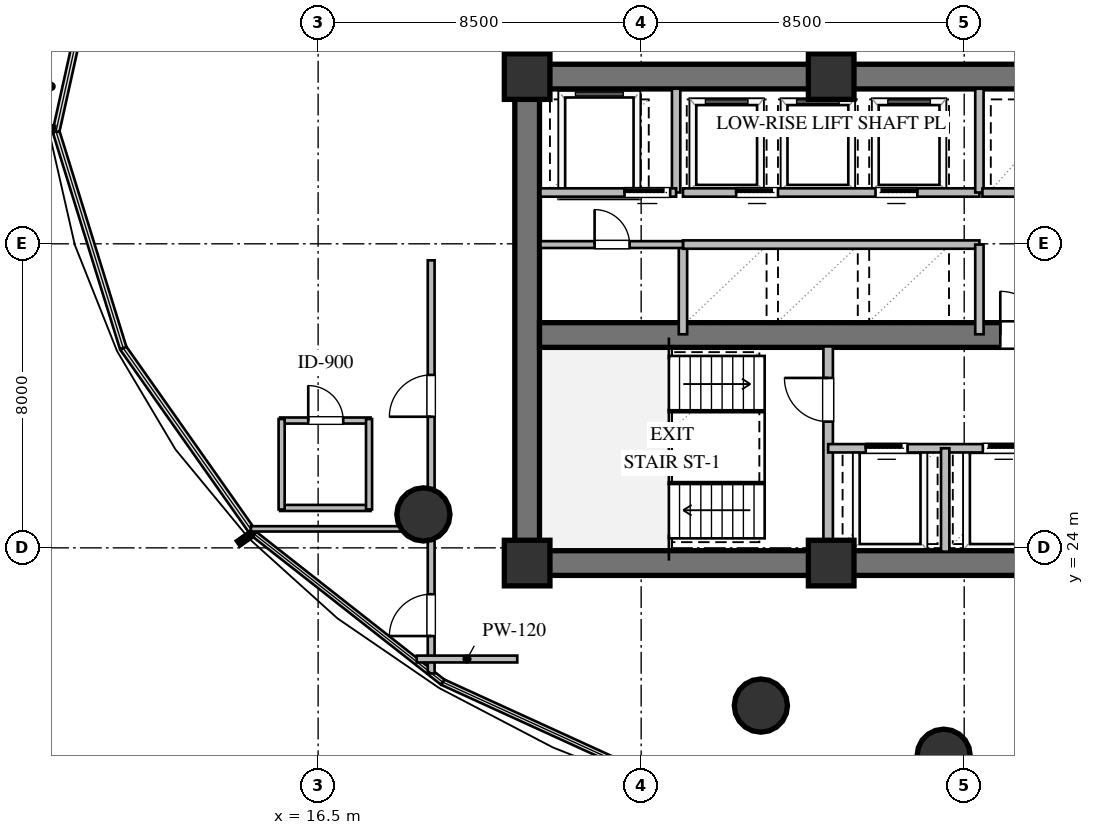
"""IFC4 building model, lengths in metres.
Left out: names, types, materials, properties, quantities, classifications, styles, units other than length and angle.
Written with IfcOpenShell. Run it as: python <this file> out.ifc"""

import sys

from ifc_helpers import new_model, si_unit, direction, frame, frame_2d, origin, origin_2d, place, context, subcontext, project, spatial, rectangle, circle, extrude, element, fill, save


model = new_model("IFC4")
c1 = context("Model", 3, precision=1e-05, world=origin(), true_north=direction((0.0, 1.0)))
c2 = subcontext(c1, "Body", "Model", "MODEL_VIEW")
j1 = project(units=[si_unit("LENGTHUNIT", "METRE"), si_unit("PLANEANGLEUNIT", "RADIAN")], contexts=[c1])
p1 = place(None, origin())
s1 = spatial("IfcSite", under=j1, at=p1, CompositionType="ELEMENT")
p2 = place(p1, origin())
s2 = spatial("IfcBuilding", under=s1, at=p2, CompositionType="ELEMENT")
p3 = place(p2, frame((0.0, 0.0, 49.2)))
s3 = spatial("IfcBuildingStorey", under=s2, at=p3, CompositionType="ELEMENT", Elevation=49.2)
for number, where, z_axis, x_axis in (
    (1, (21.675, 23.6, 0.0), (0.0, 0.0, 1.0), (1.0, 0.0, 0.0)),
    (2, (21.675, 36.4, 0.0), (0.0, 0.0, 1.0), (1.0, 0.0, 0.0)),
):
    element("IfcWall", number, at=place(p3, frame(where, z_axis=z_axis, x_axis=x_axis)), inside=s3, PredefinedType="SHEAR", context=c2, shape_type="SweptSolid", body=[
        extrude(rectangle(XDim=22.65, YDim=0.65, at=frame_2d((11.325, 0.0))), origin(), (0.0, 0.0, 1.0), 3.36),
    ])
p4 = place(p3, frame((22.0, 23.925, 0.0), z_axis=(0.0, 0.0, 1.0), x_axis=(0.0, 1.0, 0.0)))
e3 = element("IfcWall", 3, at=p4, inside=s3, PredefinedType="SHEAR", context=c2, shape_type="SweptSolid", body=[
    extrude(rectangle(XDim=12.15, YDim=0.65, at=frame_2d((6.075, 0.0))), origin(), (0.0, 0.0, 1.0), 3.36),
])
p5 = place(p3, frame((22.325, 29.6, 0.0), z_axis=(0.0, 0.0, 1.0), x_axis=(1.0, 0.0, 0.0)))
e4 = element("IfcWall", 4, at=p5, inside=s3, PredefinedType="SHEAR", context=c2, shape_type="SweptSolid", body=[
    extrude(rectangle(XDim=21.35, YDim=0.65, at=frame_2d((10.675, 0.0))), origin(), (0.0, 0.0, 1.0), 3.36),
])
p6 = place(p5, frame((12.125, 0.0, 0.0)))
e5 = element("IfcOpeningElement", 5, at=p6, cuts=e4, PredefinedType="OPENING", context=c2, shape_type="SweptSolid", body=[
    extrude(rectangle(XDim=1.15, YDim=2.1, at=frame_2d((0.575, 1.05))), frame((0.0, 0.335, 0.0), z_axis=(0.0, -1.0, 0.0), x_axis=(1.0, 0.0, 0.0)), (0.0, 0.0, 1.0), 0.67),
])
for number, where, z_axis, x_axis in (
    (6, (22.0, 23.6, 0.0), (0.0, 0.0, 1.0), (1.0, 0.0, 0.0)),
    (7, (30.0, 23.6, 0.0), (0.0, 0.0, 1.0), (1.0, 0.0, 0.0)),
    (8, (30.0, 36.4, 0.0), (0.0, 0.0, 1.0), (1.0, 0.0, 0.0)),
    (9, (22.0, 36.4, 0.0), (0.0, 0.0, 1.0), (1.0, 0.0, 0.0)),
):
    element("IfcColumn", number, at=place(p3, frame(where, z_axis=z_axis, x_axis=x_axis)), inside=s3, PredefinedType="COLUMN", context=c2, shape_type="SweptSolid", body=[
        extrude(rectangle(XDim=1.2, YDim=1.2, at=origin_2d()), origin(), (0.0, 0.0, 1.0), 3.6),
    ])
for number, where, z_axis, x_axis in (
    (10, (19.27, 24.88, 0.0), (0.0, 0.0, 1.0), (1.0, 0.0, 0.0)),
    (11, (28.15, 19.85, 0.0), (0.0, 0.0, 1.0), (1.0, 0.0, 0.0)),
    (12, (32.96, 18.53, 0.0), (0.0, 0.0, 1.0), (1.0, 0.0, 0.0)),
):
    element("IfcColumn", number, at=place(p3, frame(where, z_axis=z_axis, x_axis=x_axis)), inside=s3, PredefinedType="COLUMN", context=c2, shape_type="SweptSolid", body=[
        extrude(circle(Radius=0.7, at=origin_2d()), origin(), (0.0, 0.0, 1.0), 3.6),
    ])
p7 = place(p3, frame((29.92, 23.9, 0.0), z_axis=(0.0, 0.0, 1.0), x_axis=(0.0, 1.0, 0.0)))
e13 = element("IfcWall", 13, at=p7, inside=s3, PredefinedType="SOLIDWALL", context=c2, shape_type="SweptSolid", body=[
    extrude(rectangle(XDim=5.4, YDim=0.25, at=frame_2d((2.7, 0.0))), origin(), (0.0, 0.0, 1.0), 3.36),
])
p8 = place(p7, frame((3.421, 0.0, 0.0)))
e14 = element("IfcOpeningElement", 14, at=p8, cuts=e13, PredefinedType="OPENING", context=c2, shape_type="SweptSolid", body=[
    extrude(rectangle(XDim=1.15, YDim=2.1, at=frame_2d((0.575, 1.05))), frame((0.0, 0.135, 0.0), z_axis=(0.0, -1.0, 0.0), x_axis=(1.0, 0.0, 0.0)), (0.0, 0.0, 1.0), 0.27),
])
p9 = place(p3, frame((29.92, 26.62, 0.0), z_axis=(0.0, 0.0, 1.0), x_axis=(1.0, 0.0, 0.0)))
e15 = element("IfcWall", 15, at=p9, inside=s3, PredefinedType="SOLIDWALL", context=c2, shape_type="SweptSolid", body=[
    extrude(rectangle(XDim=6.16, YDim=0.22, at=frame_2d((3.08, 0.0))), origin(), (0.0, 0.0, 1.0), 3.36),
])
p10 = place(p9, frame((0.99, 0.0, 0.0)))
e16 = element("IfcOpeningElement", 16, at=p10, cuts=e15, PredefinedType="OPENING", context=c2, shape_type="SweptSolid", body=[
    extrude(rectangle(XDim=1.1, YDim=2.1, at=frame_2d((0.55, 1.05))), frame((0.0, 0.12, 0.0), z_axis=(0.0, -1.0, 0.0), x_axis=(1.0, 0.0, 0.0)), (0.0, 0.0, 1.0), 0.24),
])
p11 = place(p9, frame((4.07, 0.0, 0.0)))
e17 = element("IfcOpeningElement", 17, at=p11, cuts=e15, PredefinedType="OPENING", context=c2, shape_type="SweptSolid", body=[
    extrude(rectangle(XDim=1.1, YDim=2.1, at=frame_2d((0.55, 1.05))), frame((0.0, 0.12, 0.0), z_axis=(0.0, -1.0, 0.0), x_axis=(1.0, 0.0, 0.0)), (0.0, 0.0, 1.0), 0.24),
])
p12 = place(p3, frame((33.0, 23.9, 0.0), z_axis=(0.0, 0.0, 1.0), x_axis=(0.0, 1.0, 0.0)))
e18 = element("IfcWall", 18, at=p12, inside=s3, PredefinedType="SOLIDWALL", context=c2, shape_type="SweptSolid", body=[
    extrude(rectangle(XDim=2.72, YDim=0.22, at=frame_2d((1.36, 0.0))), origin(), (0.0, 0.0, 1.0), 3.36),
])
p13 = place(p3, frame((25.92, 33.35, 0.0), z_axis=(0.0, 0.0, 1.0), x_axis=(0.0, 1.0, 0.0)))
e19 = element("IfcWall", 19, at=p13, inside=s3, PredefinedType="SOLIDWALL", context=c2, shape_type="SweptSolid", body=[
    extrude(rectangle(XDim=2.73, YDim=0.22, at=frame_2d((1.365, 0.0))), origin(), (0.0, 0.0, 1.0), 3.36),
])
p14 = place(p3, frame((22.35, 33.35, 0.0), z_axis=(0.0, 0.0, 1.0), x_axis=(1.0, 0.0, 0.0)))
e20 = element("IfcWall", 20, at=p14, inside=s3, PredefinedType="SOLIDWALL", context=c2, shape_type="SweptSolid", body=[
    extrude(rectangle(XDim=3.57, YDim=0.22, at=frame_2d((1.785, 0.0))), origin(), (0.0, 0.0, 1.0), 3.36),
])
p15 = place(p14, frame((2.213, 0.0, 0.0)))
e21 = element("IfcOpeningElement", 21, at=p15, cuts=e20, PredefinedType="OPENING", context=c2, shape_type="SweptSolid", body=[
    extrude(rectangle(XDim=1.2, YDim=2.1, at=frame_2d((0.6, 1.05))), frame((0.0, 0.12, 0.0), z_axis=(0.0, -1.0, 0.0), x_axis=(1.0, 0.0, 0.0)), (0.0, 0.0, 1.0), 0.24),
])
p16 = place(p3, frame((26.1, 29.62, 0.0), z_axis=(0.0, 0.0, 1.0), x_axis=(0.0, 1.0, 0.0)))
e22 = element("IfcWall", 22, at=p16, inside=s3, PredefinedType="SOLIDWALL", context=c2, shape_type="SweptSolid", body=[
    extrude(rectangle(XDim=2.36, YDim=0.22, at=frame_2d((1.18, 0.0))), origin(), (0.0, 0.0, 1.0), 3.36),
])
p17 = place(p3, frame((26.1, 31.98, 0.0), z_axis=(0.0, 0.0, 1.0), x_axis=(1.0, 0.0, 0.0)))
e23 = element("IfcWall", 23, at=p17, inside=s3, PredefinedType="SOLIDWALL", context=c2, shape_type="SweptSolid", body=[
    extrude(rectangle(XDim=7.8, YDim=0.22, at=frame_2d((3.9, 0.0))), origin(), (0.0, 0.0, 1.0), 3.36),
])
p18 = place(p3, frame((33.9, 29.62, 0.0), z_axis=(0.0, 0.0, 1.0), x_axis=(0.0, 1.0, 0.0)))
e24 = element("IfcWall", 24, at=p18, inside=s3, PredefinedType="SOLIDWALL", context=c2, shape_type="SweptSolid", body=[
    extrude(rectangle(XDim=2.36, YDim=0.22, at=frame_2d((1.18, 0.0))), origin(), (0.0, 0.0, 1.0), 3.36),
])
p19 = place(p3, frame((26.1, 33.35, 0.0), z_axis=(0.0, 0.0, 1.0), x_axis=(1.0, 0.0, 0.0)))
e25 = element("IfcWall", 25, at=p19, inside=s3, PredefinedType="SOLIDWALL", context=c2, shape_type="SweptSolid", body=[
    extrude(rectangle(XDim=7.8, YDim=0.22, at=frame_2d((3.9, 0.0))), origin(), (0.0, 0.0, 1.0), 3.36),
])
p20 = place(p19, frame((1.4, 0.0, 0.0)))
e26 = element("IfcOpeningElement", 26, at=p20, cuts=e25, PredefinedType="OPENING", context=c2, shape_type="SweptSolid", body=[
    extrude(rectangle(XDim=1.1, YDim=2.1, at=frame_2d((0.55, 1.05))), frame((0.0, 0.12, 0.0), z_axis=(0.0, -1.0, 0.0), x_axis=(1.0, 0.0, 0.0)), (0.0, 0.0, 1.0), 0.24),
])
p21 = place(p19, frame((5.066, 0.0, 0.0)))
e27 = element("IfcOpeningElement", 27, at=p21, cuts=e25, PredefinedType="OPENING", context=c2, shape_type="SweptSolid", body=[
    extrude(rectangle(XDim=1.1, YDim=2.1, at=frame_2d((0.55, 1.05))), frame((0.0, 0.12, 0.0), z_axis=(0.0, -1.0, 0.0), x_axis=(1.0, 0.0, 0.0)), (0.0, 0.0, 1.0), 0.24),
])
p22 = place(p3, frame((33.9, 33.35, 0.0), z_axis=(0.0, 0.0, 1.0), x_axis=(0.0, 1.0, 0.0)))
e28 = element("IfcWall", 28, at=p22, inside=s3, PredefinedType="SOLIDWALL", context=c2, shape_type="SweptSolid", body=[
    extrude(rectangle(XDim=2.73, YDim=0.22, at=frame_2d((1.365, 0.0))), origin(), (0.0, 0.0, 1.0), 3.36),
])
p23 = place(p3, frame((33.98, 33.35, 0.0), z_axis=(0.0, 0.0, 1.0), x_axis=(1.0, 0.0, 0.0)))
e29 = element("IfcWall", 29, at=p23, inside=s3, PredefinedType="SOLIDWALL", context=c2, shape_type="SweptSolid", body=[
    extrude(rectangle(XDim=7.54, YDim=0.22, at=frame_2d((3.77, 0.0))), origin(), (0.0, 0.0, 1.0), 3.36),
])
p24 = place(p3, frame((22.35, 31.98, 0.0), z_axis=(0.0, 0.0, 1.0), x_axis=(1.0, 0.0, 0.0)))
e30 = element("IfcWall", 30, at=p24, inside=s3, PredefinedType="PARTITIONING", context=c2, shape_type="SweptSolid", body=[
    extrude(rectangle(XDim=3.75, YDim=0.18, at=frame_2d((1.875, 0.0))), origin(), (0.0, 0.0, 1.0), 3.36),
])
p25 = place(p24, frame((1.425, 0.0, 0.0)))
e31 = element("IfcOpeningElement", 31, at=p25, cuts=e30, PredefinedType="OPENING", context=c2, shape_type="SweptSolid", body=[
    extrude(rectangle(XDim=0.92, YDim=2.1, at=frame_2d((0.46, 1.05))), frame((0.0, 0.1, 0.0), z_axis=(0.0, -1.0, 0.0), x_axis=(1.0, 0.0, 0.0)), (0.0, 0.0, 1.0), 0.2),
])
p26 = place(p3, frame((15.5, 25.05, 0.0), z_axis=(0.0, 0.0, 1.0), x_axis=(1.0, 0.0, 0.0)))
e32 = element("IfcWall", 32, at=p26, inside=s3, PredefinedType="PLUMBINGWALL", context=c2, shape_type="SweptSolid", body=[
    extrude(rectangle(XDim=2.38, YDim=0.16, at=frame_2d((1.19, 0.0))), origin(), (0.0, 0.0, 1.0), 3.36),
])
p27 = place(p3, frame((15.5, 27.35, 0.0), z_axis=(0.0, 0.0, 1.0), x_axis=(1.0, 0.0, 0.0)))
e33 = element("IfcWall", 33, at=p27, inside=s3, PredefinedType="PLUMBINGWALL", context=c2, shape_type="SweptSolid", body=[
    extrude(rectangle(XDim=2.38, YDim=0.16, at=frame_2d((1.19, 0.0))), origin(), (0.0, 0.0, 1.0), 3.36),
])
p28 = place(p27, frame((0.74, 0.0, 0.0)))
e34 = element("IfcOpeningElement", 34, at=p28, cuts=e33, PredefinedType="OPENING", context=c2, shape_type="SweptSolid", body=[
    extrude(rectangle(XDim=0.92, YDim=2.1, at=frame_2d((0.46, 1.05))), frame((0.0, 0.09, 0.0), z_axis=(0.0, -1.0, 0.0), x_axis=(1.0, 0.0, 0.0)), (0.0, 0.0, 1.0), 0.18),
])
for number, where, z_axis, x_axis in (
    (35, (15.54, 25.01, 0.0), (0.0, 0.0, 1.0), (0.0, 1.0, 0.0)),
    (36, (17.84, 25.01, 0.0), (0.0, 0.0, 1.0), (0.0, 1.0, 0.0)),
):
    element("IfcWall", number, at=place(p3, frame(where, z_axis=z_axis, x_axis=x_axis)), inside=s3, PredefinedType="PLUMBINGWALL", context=c2, shape_type="SweptSolid", body=[
        extrude(rectangle(XDim=2.38, YDim=0.16, at=frame_2d((1.19, 0.0))), origin(), (0.0, 0.0, 1.0), 3.36),
    ])
p29 = place(p3, frame((19.475, 20.695, 0.0), z_axis=(0.0, 0.0, 1.0), x_axis=(0.0, 1.0, 0.0)))
e37 = element("IfcWall", 37, at=p29, inside=s3, PredefinedType="PARTITIONING", context=c2, shape_type="SweptSolid", body=[
    extrude(rectangle(XDim=3.87, YDim=0.18, at=frame_2d((1.935, 0.0))), origin(), (0.0, 0.0, 1.0), 2.738),
])
p30 = place(p29, frame((0.985, 0.0, 0.0)))
e38 = element("IfcOpeningElement", 38, at=p30, cuts=e37, PredefinedType="OPENING", context=c2, shape_type="SweptSolid", body=[
    extrude(rectangle(XDim=1.1, YDim=2.1, at=frame_2d((0.55, 1.05))), frame((0.0, 0.1, 0.0), z_axis=(0.0, -1.0, 0.0), x_axis=(1.0, 0.0, 0.0)), (0.0, 0.0, 1.0), 0.2),
])
p31 = place(p3, frame((21.74, 21.075, 0.0), z_axis=(0.0, 0.0, 1.0), x_axis=(-1.0, 0.0, 0.0)))
e39 = element("IfcWall", 39, at=p31, inside=s3, PredefinedType="PARTITIONING", context=c2, shape_type="SweptSolid", body=[
    extrude(rectangle(XDim=2.645, YDim=0.18, at=frame_2d((1.323, 0.0))), origin(), (0.0, 0.0, 1.0), 3.36),
])
p32 = place(p3, frame((19.475, 24.435, 0.0), z_axis=(0.0, 0.0, 1.0), x_axis=(0.0, 1.0, 0.0)))
e40 = element("IfcWall", 40, at=p32, inside=s3, PredefinedType="PARTITIONING", context=c2, shape_type="SweptSolid", body=[
    extrude(rectangle(XDim=7.13, YDim=0.18, at=frame_2d((3.565, 0.0))), origin(), (0.0, 0.0, 1.0), 2.738),
])
p33 = place(p32, frame((3.015, 0.0, 0.0)))
e41 = element("IfcOpeningElement", 41, at=p33, cuts=e40, PredefinedType="OPENING", context=c2, shape_type="SweptSolid", body=[
    extrude(rectangle(XDim=1.1, YDim=2.1, at=frame_2d((0.55, 1.05))), frame((0.0, 0.1, 0.0), z_axis=(0.0, -1.0, 0.0), x_axis=(1.0, 0.0, 0.0)), (0.0, 0.0, 1.0), 0.2),
])
p34 = place(p3, frame((14.732, 24.5, 0.0), z_axis=(0.0, 0.0, 1.0), x_axis=(1.0, 0.0, 0.0)))
e42 = element("IfcWall", 42, at=p34, inside=s3, PredefinedType="PARTITIONING", context=c2, shape_type="SweptSolid", body=[
    extrude(rectangle(XDim=4.773, YDim=0.14, at=frame_2d((2.386, 0.0))), origin(), (0.0, 0.0, 1.0), 2.806),
])
p35 = place(p8, origin())
e43 = element("IfcDoor", 43, at=p35, inside=s3, OperationType="SINGLE_SWING_RIGHT", PredefinedType="DOOR", context=c2, shape_type="SweptSolid", body=[
    extrude(rectangle(XDim=1.15, YDim=2.1, at=frame_2d((0.575, 1.05))), frame((0.0, 0.025, 0.0), z_axis=(0.0, -1.0, 0.0), x_axis=(1.0, 0.0, 0.0)), (0.0, 0.0, 1.0), 0.05),
])
fill(e14, e43)
p36 = place(p10, origin())
e44 = element("IfcDoor", 44, at=p36, inside=s3, OperationType="SLIDING_TO_LEFT", PredefinedType="DOOR", context=c2, shape_type="SweptSolid", body=[
    extrude(rectangle(XDim=1.1, YDim=2.1, at=frame_2d((0.55, 1.05))), frame((0.0, 0.025, 0.0), z_axis=(0.0, -1.0, 0.0), x_axis=(1.0, 0.0, 0.0)), (0.0, 0.0, 1.0), 0.05),
])
fill(e16, e44)
p37 = place(p11, origin())
e45 = element("IfcDoor", 45, at=p37, inside=s3, OperationType="SLIDING_TO_RIGHT", PredefinedType="DOOR", context=c2, shape_type="SweptSolid", body=[
    extrude(rectangle(XDim=1.1, YDim=2.1, at=frame_2d((0.55, 1.05))), frame((0.0, 0.025, 0.0), z_axis=(0.0, -1.0, 0.0), x_axis=(1.0, 0.0, 0.0)), (0.0, 0.0, 1.0), 0.05),
])
fill(e17, e45)
p38 = place(p6, origin())
e46 = element("IfcDoor", 46, at=p38, inside=s3, OperationType="SINGLE_SWING_LEFT", PredefinedType="DOOR", context=c2, shape_type="SweptSolid", body=[
    extrude(rectangle(XDim=1.15, YDim=2.1, at=frame_2d((0.575, 1.05))), frame((0.0, 0.025, 0.0), z_axis=(0.0, -1.0, 0.0), x_axis=(1.0, 0.0, 0.0)), (0.0, 0.0, 1.0), 0.05),
])
fill(e5, e46)
p39 = place(p15, origin())
e47 = element("IfcDoor", 47, at=p39, inside=s3, OperationType="SLIDING_TO_LEFT", PredefinedType="DOOR", context=c2, shape_type="SweptSolid", body=[
    extrude(rectangle(XDim=1.2, YDim=2.1, at=frame_2d((0.6, 1.05))), frame((0.0, 0.025, 0.0), z_axis=(0.0, -1.0, 0.0), x_axis=(1.0, 0.0, 0.0)), (0.0, 0.0, 1.0), 0.05),
])
fill(e21, e47)
p40 = place(p20, origin())
e48 = element("IfcDoor", 48, at=p40, inside=s3, OperationType="SLIDING_TO_LEFT", PredefinedType="DOOR", context=c2, shape_type="SweptSolid", body=[
    extrude(rectangle(XDim=1.1, YDim=2.1, at=frame_2d((0.55, 1.05))), frame((0.0, 0.025, 0.0), z_axis=(0.0, -1.0, 0.0), x_axis=(1.0, 0.0, 0.0)), (0.0, 0.0, 1.0), 0.05),
])
fill(e26, e48)
p41 = place(p21, origin())
e49 = element("IfcDoor", 49, at=p41, inside=s3, OperationType="SLIDING_TO_RIGHT", PredefinedType="DOOR", context=c2, shape_type="SweptSolid", body=[
    extrude(rectangle(XDim=1.1, YDim=2.1, at=frame_2d((0.55, 1.05))), frame((0.0, 0.025, 0.0), z_axis=(0.0, -1.0, 0.0), x_axis=(1.0, 0.0, 0.0)), (0.0, 0.0, 1.0), 0.05),
])
fill(e27, e49)
p42 = place(p25, origin())
e50 = element("IfcDoor", 50, at=p42, inside=s3, OperationType="SINGLE_SWING_LEFT", PredefinedType="DOOR", context=c2, shape_type="SweptSolid", body=[
    extrude(rectangle(XDim=0.92, YDim=2.1, at=frame_2d((0.46, 1.05))), frame((0.0, 0.025, 0.0), z_axis=(0.0, -1.0, 0.0), x_axis=(1.0, 0.0, 0.0)), (0.0, 0.0, 1.0), 0.05),
])
fill(e31, e50)
p43 = place(p28, origin())
e51 = element("IfcDoor", 51, at=p43, inside=s3, OperationType="SINGLE_SWING_LEFT", PredefinedType="DOOR", context=c2, shape_type="SweptSolid", body=[
    extrude(rectangle(XDim=0.92, YDim=2.1, at=frame_2d((0.46, 1.05))), frame((0.0, 0.025, 0.0), z_axis=(0.0, -1.0, 0.0), x_axis=(1.0, 0.0, 0.0)), (0.0, 0.0, 1.0), 0.05),
])
fill(e34, e51)
p44 = place(p30, origin())
e52 = element("IfcDoor", 52, at=p44, inside=s3, OperationType="SINGLE_SWING_LEFT", PredefinedType="DOOR", context=c2, shape_type="SweptSolid", body=[
    extrude(rectangle(XDim=1.1, YDim=2.1, at=frame_2d((0.55, 1.05))), frame((0.0, 0.025, 0.0), z_axis=(0.0, -1.0, 0.0), x_axis=(1.0, 0.0, 0.0)), (0.0, 0.0, 1.0), 0.05),
])
fill(e38, e52)
p45 = place(p33, origin())
e53 = element("IfcDoor", 53, at=p45, inside=s3, OperationType="SINGLE_SWING_LEFT", PredefinedType="DOOR", context=c2, shape_type="SweptSolid", body=[
    extrude(rectangle(XDim=1.1, YDim=2.1, at=frame_2d((0.55, 1.05))), frame((0.0, 0.025, 0.0), z_axis=(0.0, -1.0, 0.0), x_axis=(1.0, 0.0, 0.0)), (0.0, 0.0, 1.0), 0.05),
])
fill(e41, e53)
save(model, sys.argv[1])
